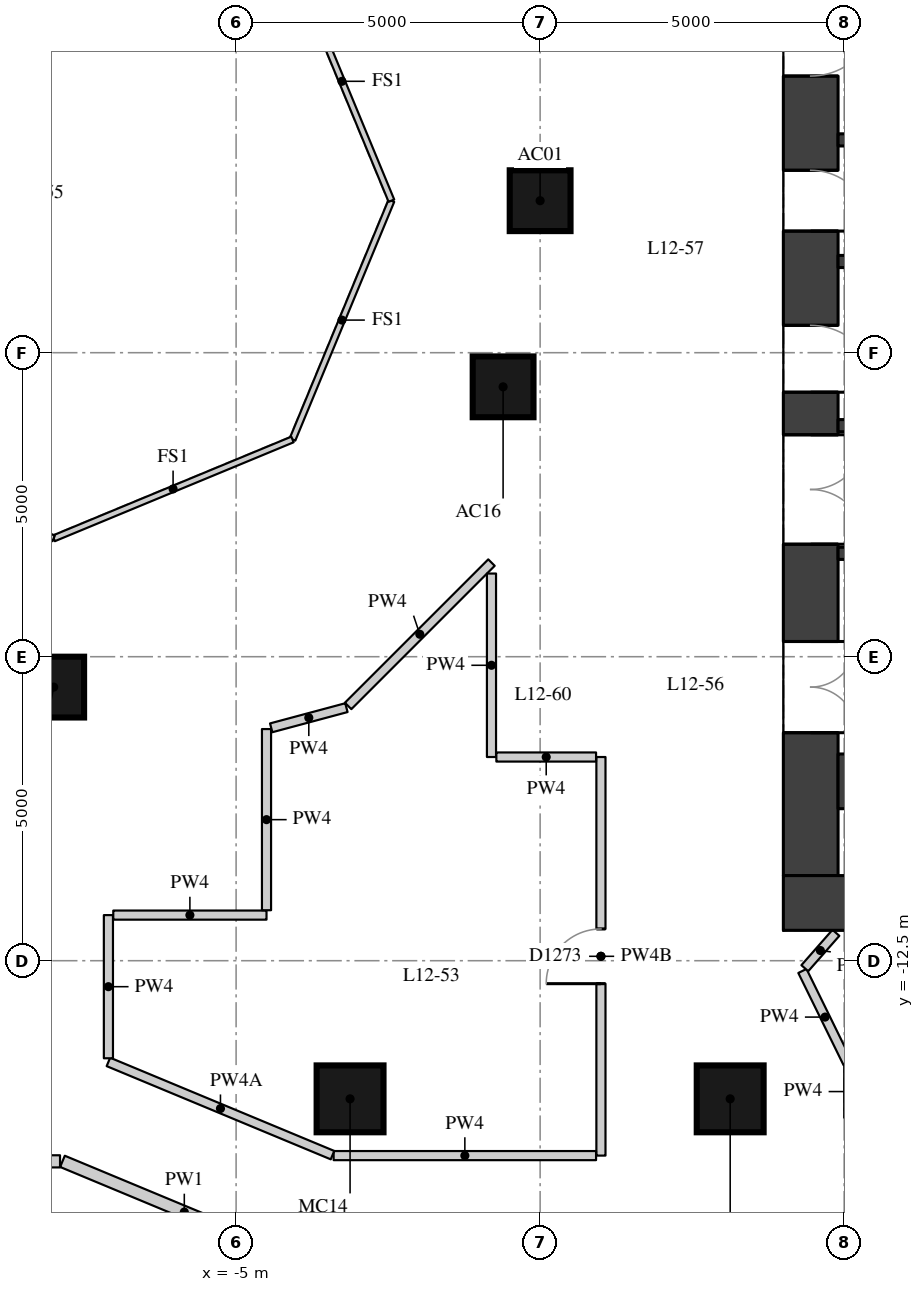
"""IFC4 building model, lengths in metres.
Left out: names, types, materials, properties, quantities, classifications, styles, units other than length and angle.
Written with IfcOpenShell. Run it as: python <this file> out.ifc"""

import sys

from ifc_helpers import new_model, si_unit, direction, frame, frame_2d, origin, origin_2d, place, context, subcontext, project, spatial, rectangle, extrude, element, fill, save


model = new_model("IFC4")
c1 = context("Model", 3, precision=1e-05, world=origin(), true_north=direction((0.0, 1.0)))
c2 = subcontext(c1, "Body", "Model", "MODEL_VIEW")
j1 = project(units=[si_unit("LENGTHUNIT", "METRE"), si_unit("PLANEANGLEUNIT", "RADIAN")], contexts=[c1])
p1 = place(None, origin())
s1 = spatial("IfcSite", under=j1, at=p1, CompositionType="ELEMENT")
p2 = place(p1, origin())
s2 = spatial("IfcBuilding", under=s1, at=p2, CompositionType="ELEMENT")
p3 = place(p2, frame((0.0, 0.0, 48.1)))
s3 = spatial("IfcBuildingStorey", under=s2, at=p3, CompositionType="ELEMENT", Elevation=48.1)
for number, where, z_axis, x_axis in (
    (1, (0.0, 0.0, 0.0), (0.0, 0.0, 1.0), (1.0, 0.0, 0.0)),
    (2, (-8.0, -8.0, 0.0), (0.0, 0.0, 1.0), (1.0, 0.0, 0.0)),
    (3, (-0.609, -3.062, 0.0), (0.0, 0.0, 1.0), (1.0, 0.0, 0.0)),
):
    element("IfcColumn", number, at=place(p3, frame(where, z_axis=z_axis, x_axis=x_axis)), inside=s3, PredefinedType="COLUMN", context=c2, shape_type="SweptSolid", body=[
        extrude(rectangle(XDim=1.0, YDim=1.0, at=origin_2d()), origin(), (0.0, 0.0, 1.0), 3.3),
    ])
for number, where, z_axis, x_axis in (
    (4, (-3.126, -14.772, 0.0), (0.0, 0.0, 1.0), (1.0, 0.0, 0.0)),
    (5, (3.126, -14.772, 0.0), (0.0, 0.0, 1.0), (1.0, 0.0, 0.0)),
):
    element("IfcColumn", number, at=place(p3, frame(where, z_axis=z_axis, x_axis=x_axis)), inside=s3, PredefinedType="COLUMN", context=c2, shape_type="SweptSolid", body=[
        extrude(rectangle(XDim=1.1, YDim=1.1, at=origin_2d()), origin(), (0.0, 0.0, 1.0), 3.3),
    ])
p4 = place(p3, frame((4.45, -11.1, 0.0), z_axis=(0.0, 0.0, 1.0), x_axis=(0.0, 1.0, 0.0)))
e6 = element("IfcWall", 6, at=p4, inside=s3, PredefinedType="SHEAR", context=c2, shape_type="SweptSolid", body=[
    extrude(rectangle(XDim=22.2, YDim=0.9, at=frame_2d((11.1, 0.0))), origin(), (0.0, 0.0, 1.0), 3.02),
])
p5 = place(p4, frame((2.35, 0.0, 0.0)))
e7 = element("IfcOpeningElement", 7, at=p5, cuts=e6, PredefinedType="OPENING", context=c2, shape_type="SweptSolid", body=[
    extrude(rectangle(XDim=1.5, YDim=2.1, at=frame_2d((0.75, 1.05))), frame((0.0, 0.46, 0.0), z_axis=(0.0, -1.0, 0.0), x_axis=(1.0, 0.0, 0.0)), (0.0, 0.0, 1.0), 0.92),
])
p6 = place(p4, frame((5.45, 0.0, 0.0)))
e8 = element("IfcOpeningElement", 8, at=p6, cuts=e6, PredefinedType="OPENING", context=c2, shape_type="SweptSolid", body=[
    extrude(rectangle(XDim=1.8, YDim=2.1, at=frame_2d((0.9, 1.05))), frame((0.0, 0.46, 0.0), z_axis=(0.0, -1.0, 0.0), x_axis=(1.0, 0.0, 0.0)), (0.0, 0.0, 1.0), 0.92),
])
p7 = place(p4, frame((7.95, 0.0, 0.0)))
e9 = element("IfcOpeningElement", 9, at=p7, cuts=e6, PredefinedType="OPENING", context=c2, shape_type="SweptSolid", body=[
    extrude(rectangle(XDim=1.1, YDim=2.1, at=frame_2d((0.55, 1.05))), frame((0.0, 0.46, 0.0), z_axis=(0.0, -1.0, 0.0), x_axis=(1.0, 0.0, 0.0)), (0.0, 0.0, 1.0), 0.92),
])
p8 = place(p4, frame((10.6, 0.0, 0.0)))
e10 = element("IfcOpeningElement", 10, at=p8, cuts=e6, PredefinedType="OPENING", context=c2, shape_type="SweptSolid", body=[
    extrude(rectangle(XDim=1.0, YDim=2.1, at=frame_2d((0.5, 1.05))), frame((0.0, 0.46, 0.0), z_axis=(0.0, -1.0, 0.0), x_axis=(1.0, 0.0, 0.0)), (0.0, 0.0, 1.0), 0.92),
])
p9 = place(p4, frame((13.15, 0.0, 0.0)))
e11 = element("IfcOpeningElement", 11, at=p9, cuts=e6, PredefinedType="OPENING", context=c2, shape_type="SweptSolid", body=[
    extrude(rectangle(XDim=1.1, YDim=2.1, at=frame_2d((0.55, 1.05))), frame((0.0, 0.46, 0.0), z_axis=(0.0, -1.0, 0.0), x_axis=(1.0, 0.0, 0.0)), (0.0, 0.0, 1.0), 0.92),
])
p10 = place(p4, frame((14.95, 0.0, 0.0)))
e12 = element("IfcOpeningElement", 12, at=p10, cuts=e6, PredefinedType="OPENING", context=c2, shape_type="SweptSolid", body=[
    extrude(rectangle(XDim=1.8, YDim=2.1, at=frame_2d((0.9, 1.05))), frame((0.0, 0.46, 0.0), z_axis=(0.0, -1.0, 0.0), x_axis=(1.0, 0.0, 0.0)), (0.0, 0.0, 1.0), 0.92),
])
p11 = place(p4, frame((18.35, 0.0, 0.0)))
e13 = element("IfcOpeningElement", 13, at=p11, cuts=e6, PredefinedType="OPENING", context=c2, shape_type="SweptSolid", body=[
    extrude(rectangle(XDim=1.5, YDim=2.1, at=frame_2d((0.75, 1.05))), frame((0.0, 0.46, 0.0), z_axis=(0.0, -1.0, 0.0), x_axis=(1.0, 0.0, 0.0)), (0.0, 0.0, 1.0), 0.92),
])
p12 = place(p3, frame((4.0, -11.55, 0.0), z_axis=(0.0, 0.0, 1.0), x_axis=(1.0, 0.0, 0.0)))
e14 = element("IfcWall", 14, at=p12, inside=s3, PredefinedType="SHEAR", context=c2, shape_type="SweptSolid", body=[
    extrude(rectangle(XDim=15.2, YDim=0.9, at=frame_2d((7.6, 0.0))), origin(), (0.0, 0.0, 1.0), 3.02),
])
p13 = place(p3, frame((4.9, -9.55, 0.0), z_axis=(0.0, 0.0, 1.0), x_axis=(1.0, 0.0, 0.0)))
e15 = element("IfcWall", 15, at=p13, inside=s3, PredefinedType="SHEAR", context=c2, shape_type="SweptSolid", body=[
    extrude(rectangle(XDim=10.2, YDim=0.9, at=frame_2d((5.1, 0.0))), origin(), (0.0, 0.0, 1.0), 3.02),
])
for number, where, z_axis, x_axis in (
    (16, (4.9, 1.0, 0.0), (0.0, 0.0, 1.0), (1.0, 0.0, 0.0)),
    (17, (4.9, -1.0, 0.0), (0.0, 0.0, 1.0), (1.0, 0.0, 0.0)),
):
    element("IfcWall", number, at=place(p3, frame(where, z_axis=z_axis, x_axis=x_axis)), inside=s3, PredefinedType="SHEAR", context=c2, shape_type="SweptSolid", body=[
        extrude(rectangle(XDim=10.2, YDim=0.2, at=frame_2d((5.1, 0.0))), origin(), (0.0, 0.0, 1.0), 3.02),
    ])
p14 = place(p3, frame((4.9, -3.7, 0.0), z_axis=(0.0, 0.0, 1.0), x_axis=(1.0, 0.0, 0.0)))
e18 = element("IfcWall", 18, at=p14, inside=s3, PredefinedType="SHEAR", context=c2, shape_type="SweptSolid", body=[
    extrude(rectangle(XDim=10.2, YDim=0.2, at=frame_2d((5.1, 0.0))), origin(), (0.0, 0.0, 1.0), 3.02),
])
p15 = place(p14, frame((6.3, 0.0, 0.0)))
e19 = element("IfcOpeningElement", 19, at=p15, cuts=e18, PredefinedType="OPENING", context=c2, shape_type="SweptSolid", body=[
    extrude(rectangle(XDim=1.1, YDim=2.1, at=frame_2d((0.55, 1.05))), frame((0.0, 0.11, 0.0), z_axis=(0.0, -1.0, 0.0), x_axis=(1.0, 0.0, 0.0)), (0.0, 0.0, 1.0), 0.22),
])
p16 = place(p14, frame((8.6, 0.0, 0.0)))
e20 = element("IfcOpeningElement", 20, at=p16, cuts=e18, PredefinedType="OPENING", context=c2, shape_type="SweptSolid", body=[
    extrude(rectangle(XDim=1.1, YDim=2.1, at=frame_2d((0.55, 1.05))), frame((0.0, 0.11, 0.0), z_axis=(0.0, -1.0, 0.0), x_axis=(1.0, 0.0, 0.0)), (0.0, 0.0, 1.0), 0.22),
])
p17 = place(p3, frame((4.9, -5.8, 0.0), z_axis=(0.0, 0.0, 1.0), x_axis=(1.0, 0.0, 0.0)))
e21 = element("IfcWall", 21, at=p17, inside=s3, PredefinedType="SHEAR", context=c2, shape_type="SweptSolid", body=[
    extrude(rectangle(XDim=10.2, YDim=0.2, at=frame_2d((5.1, 0.0))), origin(), (0.0, 0.0, 1.0), 3.02),
])
p18 = place(p3, frame((10.692, -15.247, 0.0), z_axis=(0.0, 0.0, 1.0), x_axis=(-0.950852414815, -0.309644449718, 0.0)))
e22 = element("IfcWall", 22, at=p18, inside=s3, PredefinedType="PARTITIONING", context=c2, shape_type="SweptSolid", body=[
    extrude(rectangle(XDim=7.296, YDim=0.2, at=frame_2d((3.648, 0.0))), origin(), (0.0, 0.0, 1.0), 3.02),
])
p19 = place(p18, frame((4.327, 0.0, 0.0)))
e23 = element("IfcOpeningElement", 23, at=p19, cuts=e22, PredefinedType="OPENING", context=c2, shape_type="SweptSolid", body=[
    extrude(rectangle(XDim=1.0, YDim=2.1, at=frame_2d((0.5, 1.05))), frame((0.0, 0.11, 0.0), z_axis=(0.0, -1.0, 0.0), x_axis=(1.0, 0.0, 0.0)), (0.0, 0.0, 1.0), 0.22),
])
p20 = place(p18, frame((0.22, 0.0, 0.0)))
e24 = element("IfcOpeningElement", 24, at=p20, cuts=e22, PredefinedType="OPENING", context=c2, shape_type="SweptSolid", body=[
    extrude(rectangle(XDim=1.1, YDim=2.1, at=frame_2d((0.55, 1.05))), frame((0.0, 0.11, 0.0), z_axis=(0.0, -1.0, 0.0), x_axis=(1.0, 0.0, 0.0)), (0.0, 0.0, 1.0), 0.22),
])
p21 = place(p3, frame((-3.848, -17.468, 0.0), z_axis=(0.0, 0.0, 1.0), x_axis=(-0.923248226412, 0.384203998454, 0.0)))
e25 = element("IfcWall", 25, at=p21, inside=s3, PredefinedType="PARTITIONING", context=c2, shape_type="SweptSolid", body=[
    extrude(rectangle(XDim=4.341, YDim=0.2, at=frame_2d((2.17, 0.0))), origin(), (0.0, 0.0, 1.0), 3.02),
])
p22 = place(p3, frame((-7.896, -15.8, 0.0), z_axis=(0.0, 0.0, 1.0), x_axis=(-1.0, 0.0, 0.0)))
e26 = element("IfcWall", 26, at=p22, inside=s3, PredefinedType="PARTITIONING", context=c2, shape_type="SweptSolid", body=[
    extrude(rectangle(XDim=2.858, YDim=0.2, at=frame_2d((1.429, 0.0))), origin(), (0.0, 0.0, 1.0), 3.02),
])
p23 = place(p22, frame((1.538, 0.0, 0.0)))
e27 = element("IfcOpeningElement", 27, at=p23, cuts=e26, PredefinedType="OPENING", context=c2, shape_type="SweptSolid", body=[
    extrude(rectangle(XDim=1.1, YDim=2.1, at=frame_2d((0.55, 1.05))), frame((0.0, 0.11, 0.0), z_axis=(0.0, -1.0, 0.0), x_axis=(1.0, 0.0, 0.0)), (0.0, 0.0, 1.0), 0.22),
])
p24 = place(p3, frame((1.0, -9.15, 0.0), z_axis=(0.0, 0.0, 1.0), x_axis=(0.0, -1.0, 0.0)))
e28 = element("IfcWall", 28, at=p24, inside=s3, PredefinedType="PARTITIONING", context=c2, shape_type="SweptSolid", body=[
    extrude(rectangle(XDim=6.556, YDim=0.15, at=frame_2d((3.278, 0.0))), origin(), (0.0, 0.0, 1.0), 2.47),
])
p25 = place(p24, frame((2.828, 0.0, 0.0)))
e29 = element("IfcOpeningElement", 29, at=p25, cuts=e28, PredefinedType="OPENING", context=c2, shape_type="SweptSolid", body=[
    extrude(rectangle(XDim=0.9, YDim=2.1, at=frame_2d((0.45, 1.05))), frame((0.0, 0.085, 0.0), z_axis=(0.0, -1.0, 0.0), x_axis=(1.0, 0.0, 0.0)), (0.0, 0.0, 1.0), 0.17),
])
p26 = place(p3, frame((0.92, -15.706, 0.0), z_axis=(0.0, 0.0, 1.0), x_axis=(-1.0, 0.0, 0.0)))
e30 = element("IfcWall", 30, at=p26, inside=s3, PredefinedType="PARTITIONING", context=c2, shape_type="SweptSolid", body=[
    extrude(rectangle(XDim=4.316, YDim=0.15, at=frame_2d((2.158, 0.0))), origin(), (0.0, 0.0, 1.0), 3.02),
])
p27 = place(p3, frame((-3.415, -15.698, 0.0), z_axis=(0.0, 0.0, 1.0), x_axis=(-0.923293917367, 0.38409418396, 0.0)))
e31 = element("IfcWall", 31, at=p27, inside=s3, PredefinedType="PARTITIONING", context=c2, shape_type="SweptSolid", body=[
    extrude(rectangle(XDim=3.992, YDim=0.15, at=frame_2d((1.996, 0.0))), origin(), (0.0, 0.0, 1.0), 2.57),
])
p28 = place(p3, frame((-7.1, -14.105, 0.0), z_axis=(0.0, 0.0, 1.0), x_axis=(0.0, 1.0, 0.0)))
e32 = element("IfcWall", 32, at=p28, inside=s3, PredefinedType="PARTITIONING", context=c2, shape_type="SweptSolid", body=[
    extrude(rectangle(XDim=2.355, YDim=0.15, at=frame_2d((1.177, 0.0))), origin(), (0.0, 0.0, 1.0), 3.02),
])
p29 = place(p3, frame((-7.02, -11.75, 0.0), z_axis=(0.0, 0.0, 1.0), x_axis=(1.0, 0.0, 0.0)))
e33 = element("IfcWall", 33, at=p29, inside=s3, PredefinedType="PARTITIONING", context=c2, shape_type="SweptSolid", body=[
    extrude(rectangle(XDim=2.52, YDim=0.15, at=frame_2d((1.26, 0.0))), origin(), (0.0, 0.0, 1.0), 3.02),
])
p30 = place(p3, frame((-4.5, -11.67, 0.0), z_axis=(0.0, 0.0, 1.0), x_axis=(0.0, 1.0, 0.0)))
e34 = element("IfcWall", 34, at=p30, inside=s3, PredefinedType="PARTITIONING", context=c2, shape_type="SweptSolid", body=[
    extrude(rectangle(XDim=2.98, YDim=0.15, at=frame_2d((1.49, 0.0))), origin(), (0.0, 0.0, 1.0), 3.02),
])
p31 = place(p3, frame((-4.423, -8.67, 0.0), z_axis=(0.0, 0.0, 1.0), x_axis=(0.965898680525, 0.258920333232, 0.0)))
e35 = element("IfcWall", 35, at=p31, inside=s3, PredefinedType="PARTITIONING", context=c2, shape_type="SweptSolid", body=[
    extrude(rectangle(XDim=1.281, YDim=0.15, at=frame_2d((0.64, 0.0))), origin(), (0.0, 0.0, 1.0), 3.02),
])
p32 = place(p3, frame((-3.158, -8.31, 0.0), z_axis=(0.0, 0.0, 1.0), x_axis=(0.707106781187, 0.707106781187, 0.0)))
e36 = element("IfcWall", 36, at=p32, inside=s3, PredefinedType="PARTITIONING", context=c2, shape_type="SweptSolid", body=[
    extrude(rectangle(XDim=3.334, YDim=0.15, at=frame_2d((1.667, 0.0))), origin(), (0.0, 0.0, 1.0), 3.02),
])
p33 = place(p3, frame((-0.8, -6.132, 0.0), z_axis=(0.0, 0.0, 1.0), x_axis=(0.0, -1.0, 0.0)))
e37 = element("IfcWall", 37, at=p33, inside=s3, PredefinedType="PARTITIONING", context=c2, shape_type="SweptSolid", body=[
    extrude(rectangle(XDim=3.018, YDim=0.15, at=frame_2d((1.509, 0.0))), origin(), (0.0, 0.0, 1.0), 3.02),
])
p34 = place(p3, frame((-0.72, -9.15, 0.0), z_axis=(0.0, 0.0, 1.0), x_axis=(1.0, 0.0, 0.0)))
e38 = element("IfcWall", 38, at=p34, inside=s3, PredefinedType="PARTITIONING", context=c2, shape_type="SweptSolid", body=[
    extrude(rectangle(XDim=1.64, YDim=0.15, at=frame_2d((0.82, 0.0))), origin(), (0.0, 0.0, 1.0), 3.02),
])
p35 = place(p3, frame((5.058, -14.186, 0.0), z_axis=(0.0, 0.0, 1.0), x_axis=(-0.440556792244, 0.897724742228, 0.0)))
e39 = element("IfcWall", 39, at=p35, inside=s3, PredefinedType="PARTITIONING", context=c2, shape_type="SweptSolid", body=[
    extrude(rectangle(XDim=1.69, YDim=0.15, at=frame_2d((0.845, 0.0))), origin(), (0.0, 0.0, 1.0), 3.02),
])
p36 = place(p3, frame((4.353, -12.623, 0.0), z_axis=(0.0, 0.0, 1.0), x_axis=(0.660265480509, 0.751032286422, 0.0)))
e40 = element("IfcWall", 40, at=p36, inside=s3, PredefinedType="PARTITIONING", context=c2, shape_type="SweptSolid", body=[
    extrude(rectangle(XDim=0.775, YDim=0.15, at=frame_2d((0.387, 0.0))), origin(), (0.0, 0.0, 1.0), 2.57),
])
for number, where, z_axis, x_axis in (
    (41, (-2.446, 0.0, 0.0), (0.0, 0.0, 1.0), (-0.383, -0.924, 0.0)),
    (42, (-4.073, -3.927, 0.0), (0.0, 0.0, 1.0), (-0.924, -0.383, 0.0)),
    (43, (-8.0, -5.554, 0.0), (0.0, 0.0, 1.0), (-0.924, 0.383, 0.0)),
    (44, (-4.073, 3.927, 0.0), (0.0, 0.0, 1.0), (0.383, -0.924, 0.0)),
):
    element("IfcWall", number, at=place(p3, frame(where, z_axis=z_axis, x_axis=x_axis)), inside=s3, PredefinedType="PARTITIONING", context=c2, shape_type="SweptSolid", body=[
        extrude(rectangle(XDim=4.251, YDim=0.1, at=frame_2d((2.125, 0.0))), origin(), (0.0, 0.0, 1.0), 3.02),
    ])
p37 = place(p5, origin())
e45 = element("IfcDoor", 45, at=p37, inside=s3, OperationType="DOUBLE_DOOR_SINGLE_SWING", PredefinedType="DOOR", context=c2, shape_type="SweptSolid", body=[
    extrude(rectangle(XDim=1.5, YDim=2.1, at=frame_2d((0.75, 1.05))), frame((0.0, 0.025, 0.0), z_axis=(0.0, -1.0, 0.0), x_axis=(1.0, 0.0, 0.0)), (0.0, 0.0, 1.0), 0.05),
])
fill(e7, e45)
p38 = place(p6, origin())
e46 = element("IfcDoor", 46, at=p38, inside=s3, OperationType="DOUBLE_DOOR_SINGLE_SWING", PredefinedType="DOOR", context=c2, shape_type="SweptSolid", body=[
    extrude(rectangle(XDim=1.8, YDim=2.1, at=frame_2d((0.9, 1.05))), frame((0.0, 0.025, 0.0), z_axis=(0.0, -1.0, 0.0), x_axis=(1.0, 0.0, 0.0)), (0.0, 0.0, 1.0), 0.05),
])
fill(e8, e46)
p39 = place(p7, origin())
e47 = element("IfcDoor", 47, at=p39, inside=s3, OperationType="SINGLE_SWING_RIGHT", PredefinedType="DOOR", context=c2, shape_type="SweptSolid", body=[
    extrude(rectangle(XDim=1.1, YDim=2.1, at=frame_2d((0.55, 1.05))), frame((0.0, 0.025, 0.0), z_axis=(0.0, -1.0, 0.0), x_axis=(1.0, 0.0, 0.0)), (0.0, 0.0, 1.0), 0.05),
])
fill(e9, e47)
p40 = place(p8, origin())
e48 = element("IfcDoor", 48, at=p40, inside=s3, OperationType="SINGLE_SWING_RIGHT", PredefinedType="DOOR", context=c2, shape_type="SweptSolid", body=[
    extrude(rectangle(XDim=1.0, YDim=2.1, at=frame_2d((0.5, 1.05))), frame((0.0, 0.025, 0.0), z_axis=(0.0, -1.0, 0.0), x_axis=(1.0, 0.0, 0.0)), (0.0, 0.0, 1.0), 0.05),
])
fill(e10, e48)
p41 = place(p9, origin())
e49 = element("IfcDoor", 49, at=p41, inside=s3, OperationType="SINGLE_SWING_LEFT", PredefinedType="DOOR", context=c2, shape_type="SweptSolid", body=[
    extrude(rectangle(XDim=1.1, YDim=2.1, at=frame_2d((0.55, 1.05))), frame((0.0, 0.025, 0.0), z_axis=(0.0, -1.0, 0.0), x_axis=(1.0, 0.0, 0.0)), (0.0, 0.0, 1.0), 0.05),
])
fill(e11, e49)
p42 = place(p25, origin())
e50 = element("IfcDoor", 50, at=p42, inside=s3, OperationType="SINGLE_SWING_LEFT", PredefinedType="DOOR", context=c2, shape_type="SweptSolid", body=[
    extrude(rectangle(XDim=0.9, YDim=2.1, at=frame_2d((0.45, 1.05))), frame((0.0, 0.025, 0.0), z_axis=(0.0, -1.0, 0.0), x_axis=(1.0, 0.0, 0.0)), (0.0, 0.0, 1.0), 0.05),
])
fill(e29, e50)
save(model, sys.argv[1])
